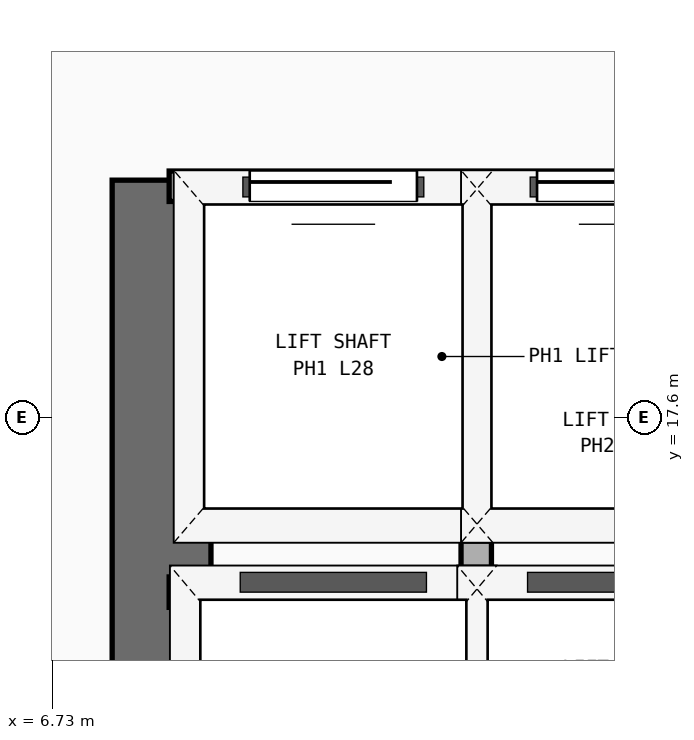
"""IFC4 building model, lengths in metres.
Left out: names, types, materials, properties, quantities, classifications, styles, units other than length and angle.
Written with IfcOpenShell. Run it as: python <this file> out.ifc"""

import sys

from ifc_helpers import new_model, si_unit, direction, frame, frame_2d, origin, place, context, subcontext, project, spatial, rectangle, extrude, element, fill, save


model = new_model("IFC4")
c1 = context("Model", 3, precision=1e-05, world=origin(), true_north=direction((0.0, 1.0)))
c2 = subcontext(c1, "Body", "Model", "MODEL_VIEW")
j1 = project(units=[si_unit("LENGTHUNIT", "METRE"), si_unit("PLANEANGLEUNIT", "RADIAN")], contexts=[c1])
p1 = place(None, origin())
s1 = spatial("IfcSite", under=j1, at=p1, CompositionType="ELEMENT")
p2 = place(p1, origin())
s2 = spatial("IfcBuilding", under=s1, at=p2, CompositionType="ELEMENT")
p3 = place(p2, frame((0.0, 0.0, 110.7)))
s3 = spatial("IfcBuildingStorey", under=s2, at=p3, CompositionType="ELEMENT", Elevation=110.7)
p4 = place(p3, frame((7.45, 14.35, 0.0), z_axis=(0.0, 0.0, 1.0), x_axis=(0.0, 1.0, 0.0)))
e1 = element("IfcWall", 1, at=p4, inside=s3, PredefinedType="SHEAR", context=c2, shape_type="SweptSolid", body=[
    extrude(rectangle(XDim=4.81, YDim=0.65, at=frame_2d((2.405, 0.0))), origin(), (0.0, 0.0, 1.0), 3.54),
])
p5 = place(p3, frame((7.5, 16.45, 0.0), z_axis=(0.0, 0.0, 1.0), x_axis=(1.0, 0.0, 0.0)))
e2 = element("IfcWall", 2, at=p5, inside=s3, PredefinedType="PARTITIONING", context=c2, shape_type="SweptSolid", body=[
    extrude(rectangle(XDim=7.85, YDim=0.2, at=frame_2d((3.925, 0.0))), origin(), (0.0, 0.0, 1.0), 3.54),
])
p6 = place(p3, frame((9.52, 14.22, 0.0), z_axis=(0.0, 0.0, 1.0), x_axis=(0.0, 1.0, 0.0)))
e3 = element("IfcWall", 3, at=p6, inside=s3, PredefinedType="PARTITIONING", context=c2, shape_type="SweptSolid", body=[
    extrude(rectangle(XDim=2.23, YDim=0.2, at=frame_2d((1.115, 0.0))), origin(), (0.0, 0.0, 1.0), 3.54),
])
p7 = place(p3, frame((7.5, 19.12, 0.0), z_axis=(0.0, 0.0, 1.0), x_axis=(1.0, 0.0, 0.0)))
e4 = element("IfcWall", 4, at=p7, inside=s3, PredefinedType="PARTITIONING", context=c2, shape_type="SweptSolid", body=[
    extrude(rectangle(XDim=7.85, YDim=0.2, at=frame_2d((3.925, 0.0))), origin(), (0.0, 0.0, 1.0), 3.54),
])
p8 = place(p7, frame((0.53, 0.0, 0.0)))
e5 = element("IfcOpeningElement", 5, at=p8, cuts=e4, PredefinedType="OPENING", context=c2, shape_type="SweptSolid", body=[
    extrude(rectangle(XDim=1.1, YDim=2.2, at=frame_2d((0.55, 1.1))), frame((0.0, 0.11, 0.0), z_axis=(0.0, -1.0, 0.0), x_axis=(1.0, 0.0, 0.0)), (0.0, 0.0, 1.0), 0.22),
])
p9 = place(p7, frame((2.42, 0.0, 0.0)))
e6 = element("IfcOpeningElement", 6, at=p9, cuts=e4, PredefinedType="OPENING", context=c2, shape_type="SweptSolid", body=[
    extrude(rectangle(XDim=1.1, YDim=2.2, at=frame_2d((0.55, 1.1))), frame((0.0, 0.11, 0.0), z_axis=(0.0, -1.0, 0.0), x_axis=(1.0, 0.0, 0.0)), (0.0, 0.0, 1.0), 0.22),
])
p10 = place(p7, frame((4.31, 0.0, 0.0)))
e7 = element("IfcOpeningElement", 7, at=p10, cuts=e4, PredefinedType="OPENING", context=c2, shape_type="SweptSolid", body=[
    extrude(rectangle(XDim=1.1, YDim=2.2, at=frame_2d((0.55, 1.1))), frame((0.0, 0.11, 0.0), z_axis=(0.0, -1.0, 0.0), x_axis=(1.0, 0.0, 0.0)), (0.0, 0.0, 1.0), 0.22),
])
p11 = place(p7, frame((6.2, 0.0, 0.0)))
e8 = element("IfcOpeningElement", 8, at=p11, cuts=e4, PredefinedType="OPENING", context=c2, shape_type="SweptSolid", body=[
    extrude(rectangle(XDim=1.1, YDim=2.2, at=frame_2d((0.55, 1.1))), frame((0.0, 0.11, 0.0), z_axis=(0.0, -1.0, 0.0), x_axis=(1.0, 0.0, 0.0)), (0.0, 0.0, 1.0), 0.22),
])
p12 = place(p3, frame((9.52, 16.45, 0.0), z_axis=(0.0, 0.0, 1.0), x_axis=(0.0, 1.0, 0.0)))
e9 = element("IfcWall", 9, at=p12, inside=s3, PredefinedType="PARTITIONING", context=c2, shape_type="SweptSolid", body=[
    extrude(rectangle(XDim=2.67, YDim=0.2, at=frame_2d((1.335, 0.0))), origin(), (0.0, 0.0, 1.0), 3.54),
])
p13 = place(p8, origin())
e10 = element("IfcDoor", 10, at=p13, inside=s3, OperationType="SLIDING_TO_LEFT", PredefinedType="DOOR", context=c2, shape_type="SweptSolid", body=[
    extrude(rectangle(XDim=1.1, YDim=2.2, at=frame_2d((0.55, 1.1))), frame((0.0, 0.025, 0.0), z_axis=(0.0, -1.0, 0.0), x_axis=(1.0, 0.0, 0.0)), (0.0, 0.0, 1.0), 0.05),
])
fill(e5, e10)
p14 = place(p9, origin())
e11 = element("IfcDoor", 11, at=p14, inside=s3, OperationType="SLIDING_TO_LEFT", PredefinedType="DOOR", context=c2, shape_type="SweptSolid", body=[
    extrude(rectangle(XDim=1.1, YDim=2.2, at=frame_2d((0.55, 1.1))), frame((0.0, 0.025, 0.0), z_axis=(0.0, -1.0, 0.0), x_axis=(1.0, 0.0, 0.0)), (0.0, 0.0, 1.0), 0.05),
])
fill(e6, e11)
save(model, sys.argv[1])
